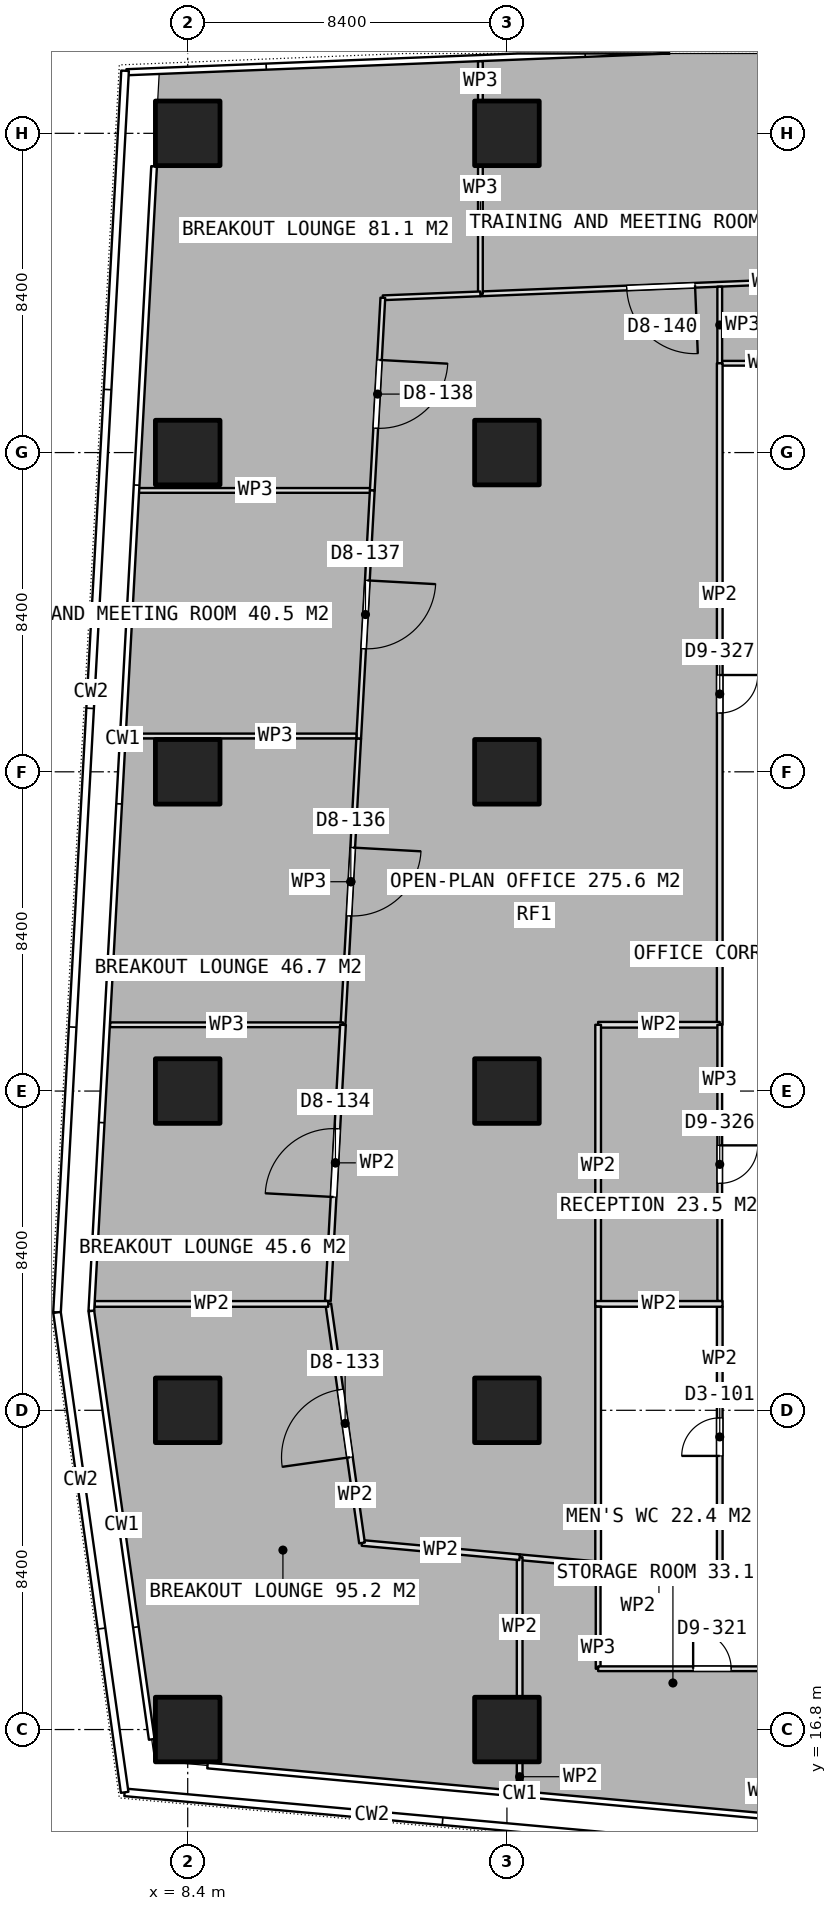
"""IFC4 building model, lengths in metres.
Left out: names, types, materials, properties, quantities, classifications, styles, units other than length and angle.
Written with IfcOpenShell. Run it as: python <this file> out.ifc"""

import sys

from ifc_helpers import new_model, si_unit, direction, frame, frame_2d, origin, origin_2d, place, context, subcontext, project, spatial, rectangle, extrude, element, fill, save


model = new_model("IFC4")
c1 = context("Model", 3, precision=1e-05, world=origin(), true_north=direction((0.0, 1.0)))
c2 = subcontext(c1, "Body", "Model", "MODEL_VIEW")
j1 = project(units=[si_unit("LENGTHUNIT", "METRE"), si_unit("PLANEANGLEUNIT", "RADIAN")], contexts=[c1])
p1 = place(None, origin())
s1 = spatial("IfcSite", under=j1, at=p1, CompositionType="ELEMENT")
p2 = place(p1, origin())
s2 = spatial("IfcBuilding", under=s1, at=p2, CompositionType="ELEMENT")
p3 = place(p2, frame((0.0, 0.0, 99.05)))
s3 = spatial("IfcBuildingStorey", under=s2, at=p3, CompositionType="ELEMENT", Elevation=99.05)
for number, where, z_axis, x_axis in (
    (1, (8.4, 16.8, 0.0), (0.0, 0.0, 1.0), (1.0, 0.0, 0.0)),
    (2, (8.4, 25.2, 0.0), (0.0, 0.0, 1.0), (1.0, 0.0, 0.0)),
    (3, (8.4, 33.6, 0.0), (0.0, 0.0, 1.0), (1.0, 0.0, 0.0)),
    (4, (8.4, 42.0, 0.0), (0.0, 0.0, 1.0), (1.0, 0.0, 0.0)),
    (5, (8.4, 50.4, 0.0), (0.0, 0.0, 1.0), (1.0, 0.0, 0.0)),
    (6, (8.4, 58.8, 0.0), (0.0, 0.0, 1.0), (1.0, 0.0, 0.0)),
    (7, (16.8, 16.8, 0.0), (0.0, 0.0, 1.0), (1.0, 0.0, 0.0)),
    (8, (16.8, 25.2, 0.0), (0.0, 0.0, 1.0), (1.0, 0.0, 0.0)),
    (9, (16.8, 33.6, 0.0), (0.0, 0.0, 1.0), (1.0, 0.0, 0.0)),
    (10, (16.8, 42.0, 0.0), (0.0, 0.0, 1.0), (1.0, 0.0, 0.0)),
    (11, (16.8, 50.4, 0.0), (0.0, 0.0, 1.0), (1.0, 0.0, 0.0)),
    (12, (16.8, 58.8, 0.0), (0.0, 0.0, 1.0), (1.0, 0.0, 0.0)),
):
    element("IfcColumn", number, at=place(p3, frame(where, z_axis=z_axis, x_axis=x_axis)), inside=s3, PredefinedType="COLUMN", context=c2, shape_type="SweptSolid", body=[
        extrude(rectangle(XDim=1.7, YDim=1.7, at=origin_2d()), origin(), (0.0, 0.0, 1.0), 3.75),
    ])
for number, where, z_axis, x_axis in (
    (13, (19.125, 21.0, 0.0), (0.0, 0.0, 1.0), (1.0, 0.0, 0.0)),
    (14, (19.125, 28.0, 0.0), (0.0, 0.0, 1.0), (1.0, 0.0, 0.0)),
):
    element("IfcWall", number, at=place(p3, frame(where, z_axis=z_axis, x_axis=x_axis)), inside=s3, PredefinedType="PARTITIONING", context=c2, shape_type="SweptSolid", body=[
        extrude(rectangle(XDim=3.35, YDim=0.15, at=frame_2d((1.675, 0.0))), origin(), (0.0, 0.0, 1.0), 3.5),
    ])
p4 = place(p3, frame((19.2, 21.075, 0.0), z_axis=(0.0, 0.0, 1.0), x_axis=(0.0, 1.0, 0.0)))
e15 = element("IfcWall", 15, at=p4, inside=s3, PredefinedType="PARTITIONING", context=c2, shape_type="SweptSolid", body=[
    extrude(rectangle(XDim=6.85, YDim=0.15, at=frame_2d((3.425, 0.0))), origin(), (0.0, 0.0, 1.0), 3.5),
])
p5 = place(p3, frame((22.4, 21.075, 0.0), z_axis=(0.0, 0.0, 1.0), x_axis=(0.0, 1.0, 0.0)))
e16 = element("IfcWall", 16, at=p5, inside=s3, PredefinedType="PARTITIONING", context=c2, shape_type="SweptSolid", body=[
    extrude(rectangle(XDim=6.85, YDim=0.15, at=frame_2d((3.425, 0.0))), origin(), (0.0, 0.0, 1.0), 3.5),
])
p6 = place(p5, frame((2.925, 0.0, 0.0)))
e17 = element("IfcOpeningElement", 17, at=p6, cuts=e16, PredefinedType="OPENING", context=c2, shape_type="SweptSolid", body=[
    extrude(rectangle(XDim=1.0, YDim=2.1, at=frame_2d((0.5, 1.05))), frame((0.0, 0.085, 0.0), z_axis=(0.0, -1.0, 0.0), x_axis=(1.0, 0.0, 0.0)), (0.0, 0.0, 1.0), 0.17),
])
p7 = place(p3, frame((25.599, 54.956, 0.0), z_axis=(0.0, 0.0, 1.0), x_axis=(-0.999199932579, -0.039993683677, 0.0)))
e18 = element("IfcWall", 18, at=p7, inside=s3, PredefinedType="PARTITIONING", context=c2, shape_type="SweptSolid", body=[
    extrude(rectangle(XDim=9.505, YDim=0.125, at=frame_2d((4.752, 0.0))), origin(), (0.0, 0.0, 1.0), 3.5),
])
p8 = place(p7, frame((3.852, 0.0, 0.0)))
e19 = element("IfcOpeningElement", 19, at=p8, cuts=e18, PredefinedType="OPENING", context=c2, shape_type="SweptSolid", body=[
    extrude(rectangle(XDim=1.8, YDim=2.1, at=frame_2d((0.9, 1.05))), frame((0.0, 0.073, 0.0), z_axis=(0.0, -1.0, 0.0), x_axis=(1.0, 0.0, 0.0)), (0.0, 0.0, 1.0), 0.145),
])
p9 = place(p3, frame((16.102, 54.576, 0.0), z_axis=(0.0, 0.0, 1.0), x_axis=(0.0, 1.0, 0.0)))
e20 = element("IfcWall", 20, at=p9, inside=s3, PredefinedType="PARTITIONING", context=c2, shape_type="SweptSolid", body=[
    extrude(rectangle(XDim=3.354, YDim=0.125, at=frame_2d((1.677, 0.0))), origin(), (0.0, 0.0, 1.0), 3.5),
])
p10 = place(p3, frame((16.102, 59.67, 0.0), z_axis=(0.0, 0.0, 1.0), x_axis=(0.0, 1.0, 0.0)))
e21 = element("IfcWall", 21, at=p10, inside=s3, PredefinedType="PARTITIONING", context=c2, shape_type="SweptSolid", body=[
    extrude(rectangle(XDim=1.03, YDim=0.125, at=frame_2d((0.515, 0.0))), origin(), (0.0, 0.0, 1.0), 3.5),
])
p11 = place(p3, frame((13.257, 49.404, 0.0), z_axis=(0.0, 0.0, 1.0), x_axis=(-1.0, 0.0, 0.0)))
e22 = element("IfcWall", 22, at=p11, inside=s3, PredefinedType="PARTITIONING", context=c2, shape_type="SweptSolid", body=[
    extrude(rectangle(XDim=6.159, YDim=0.125, at=frame_2d((3.08, 0.0))), origin(), (0.0, 0.0, 1.0), 3.5),
])
p12 = place(p3, frame((16.101, 54.576, 0.0), z_axis=(0.0, 0.0, 1.0), x_axis=(-0.999195025369, -0.040116097489, 0.0)))
e23 = element("IfcWall", 23, at=p12, inside=s3, PredefinedType="PARTITIONING", context=c2, shape_type="SweptSolid", body=[
    extrude(rectangle(XDim=2.568, YDim=0.125, at=frame_2d((1.284, 0.0))), origin(), (0.0, 0.0, 1.0), 3.5),
])
p13 = place(p3, frame((13.535, 54.473, 0.0), z_axis=(0.0, 0.0, 1.0), x_axis=(-0.054729524336, -0.998501216407, 0.0)))
e24 = element("IfcWall", 24, at=p13, inside=s3, PredefinedType="PARTITIONING", context=c2, shape_type="SweptSolid", body=[
    extrude(rectangle(XDim=5.076, YDim=0.125, at=frame_2d((2.538, 0.0))), origin(), (0.0, 0.0, 1.0), 3.5),
])
p14 = place(p13, frame((1.638, 0.0, 0.0)))
e25 = element("IfcOpeningElement", 25, at=p14, cuts=e24, PredefinedType="OPENING", context=c2, shape_type="SweptSolid", body=[
    extrude(rectangle(XDim=1.8, YDim=2.1, at=frame_2d((0.9, 1.05))), frame((0.0, 0.073, 0.0), z_axis=(0.0, -1.0, 0.0), x_axis=(1.0, 0.0, 0.0)), (0.0, 0.0, 1.0), 0.145),
])
p15 = place(p3, frame((13.257, 49.403, 0.0), z_axis=(0.0, 0.0, 1.0), x_axis=(-0.05476496183, -0.998499273388, 0.0)))
e26 = element("IfcWall", 26, at=p15, inside=s3, PredefinedType="PARTITIONING", context=c2, shape_type="SweptSolid", body=[
    extrude(rectangle(XDim=6.54, YDim=0.125, at=frame_2d((3.27, 0.0))), origin(), (0.0, 0.0, 1.0), 3.5),
])
p16 = place(p15, frame((2.37, 0.0, 0.0)))
e27 = element("IfcOpeningElement", 27, at=p16, cuts=e26, PredefinedType="OPENING", context=c2, shape_type="SweptSolid", body=[
    extrude(rectangle(XDim=1.8, YDim=2.1, at=frame_2d((0.9, 1.05))), frame((0.0, 0.073, 0.0), z_axis=(0.0, -1.0, 0.0), x_axis=(1.0, 0.0, 0.0)), (0.0, 0.0, 1.0), 0.145),
])
p17 = place(p3, frame((12.84, 42.943, 0.0), z_axis=(0.0, 0.0, 1.0), x_axis=(-1.0, 0.0, 0.0)))
e28 = element("IfcWall", 28, at=p17, inside=s3, PredefinedType="PARTITIONING", context=c2, shape_type="SweptSolid", body=[
    extrude(rectangle(XDim=6.096, YDim=0.125, at=frame_2d((3.048, 0.0))), origin(), (0.0, 0.0, 1.0), 3.5),
])
p18 = place(p3, frame((12.899, 42.872, 0.0), z_axis=(0.0, 0.0, 1.0), x_axis=(-0.054757999578, -0.998499655224, 0.0)))
e29 = element("IfcWall", 29, at=p18, inside=s3, PredefinedType="PARTITIONING", context=c2, shape_type="SweptSolid", body=[
    extrude(rectangle(XDim=7.539, YDim=0.125, at=frame_2d((3.77, 0.0))), origin(), (0.0, 0.0, 1.0), 3.5),
])
p19 = place(p18, frame((2.87, 0.0, 0.0)))
e30 = element("IfcOpeningElement", 30, at=p19, cuts=e29, PredefinedType="OPENING", context=c2, shape_type="SweptSolid", body=[
    extrude(rectangle(XDim=1.8, YDim=2.1, at=frame_2d((0.9, 1.05))), frame((0.0, 0.073, 0.0), z_axis=(0.0, -1.0, 0.0), x_axis=(1.0, 0.0, 0.0)), (0.0, 0.0, 1.0), 0.145),
])
p20 = place(p3, frame((12.486, 35.344, 0.0), z_axis=(0.0, 0.0, 1.0), x_axis=(-1.0, 0.0, 0.0)))
e31 = element("IfcWall", 31, at=p20, inside=s3, PredefinedType="PARTITIONING", context=c2, shape_type="SweptSolid", body=[
    extrude(rectangle(XDim=6.129, YDim=0.125, at=frame_2d((3.064, 0.0))), origin(), (0.0, 0.0, 1.0), 3.5),
])
p21 = place(p3, frame((28.4, 52.75, 0.0), z_axis=(0.0, 0.0, 1.0), x_axis=(-1.0, 0.0, 0.0)))
e32 = element("IfcWall", 32, at=p21, inside=s3, PredefinedType="PARTITIONING", context=c2, shape_type="SweptSolid", body=[
    extrude(rectangle(XDim=6.0, YDim=0.125, at=frame_2d((3.0, 0.0))), origin(), (0.0, 0.0, 1.0), 3.5),
])
p22 = place(p21, frame((2.5, 0.0, 0.0)))
e33 = element("IfcOpeningElement", 33, at=p22, cuts=e32, PredefinedType="OPENING", context=c2, shape_type="SweptSolid", body=[
    extrude(rectangle(XDim=1.0, YDim=2.1, at=frame_2d((0.5, 1.05))), frame((0.0, 0.073, 0.0), z_axis=(0.0, -1.0, 0.0), x_axis=(1.0, 0.0, 0.0)), (0.0, 0.0, 1.0), 0.145),
])
p23 = place(p3, frame((22.4, 52.75, 0.0), z_axis=(0.0, 0.0, 1.0), x_axis=(0.0, 1.0, 0.0)))
e34 = element("IfcWall", 34, at=p23, inside=s3, PredefinedType="PARTITIONING", context=c2, shape_type="SweptSolid", body=[
    extrude(rectangle(XDim=2.015, YDim=0.125, at=frame_2d((1.007, 0.0))), origin(), (0.0, 0.0, 1.0), 3.5),
])
p24 = place(p3, frame((22.4, 52.75, 0.0), z_axis=(0.0, 0.0, 1.0), x_axis=(0.0, -1.0, 0.0)))
e35 = element("IfcWall", 35, at=p24, inside=s3, PredefinedType="PARTITIONING", context=c2, shape_type="SweptSolid", body=[
    extrude(rectangle(XDim=17.406, YDim=0.15, at=frame_2d((8.703, 0.0))), origin(), (0.0, 0.0, 1.0), 3.5),
])
p25 = place(p24, frame((8.203, 0.0, 0.0)))
e36 = element("IfcOpeningElement", 36, at=p25, cuts=e35, PredefinedType="OPENING", context=c2, shape_type="SweptSolid", body=[
    extrude(rectangle(XDim=1.0, YDim=2.1, at=frame_2d((0.5, 1.05))), frame((0.0, 0.085, 0.0), z_axis=(0.0, -1.0, 0.0), x_axis=(1.0, 0.0, 0.0)), (0.0, 0.0, 1.0), 0.17),
])
p26 = place(p3, frame((22.4, 35.344, 0.0), z_axis=(0.0, 0.0, 1.0), x_axis=(-1.0, 0.0, 0.0)))
e37 = element("IfcWall", 37, at=p26, inside=s3, PredefinedType="PARTITIONING", context=c2, shape_type="SweptSolid", body=[
    extrude(rectangle(XDim=3.2, YDim=0.15, at=frame_2d((1.6, 0.0))), origin(), (0.0, 0.0, 1.0), 3.5),
])
p27 = place(p3, frame((19.2, 35.344, 0.0), z_axis=(0.0, 0.0, 1.0), x_axis=(0.0, -1.0, 0.0)))
e38 = element("IfcWall", 38, at=p27, inside=s3, PredefinedType="PARTITIONING", context=c2, shape_type="SweptSolid", body=[
    extrude(rectangle(XDim=7.419, YDim=0.15, at=frame_2d((3.709, 0.0))), origin(), (0.0, 0.0, 1.0), 3.5),
])
p28 = place(p3, frame((19.125, 21.153, 0.0), z_axis=(0.0, 0.0, 1.0), x_axis=(-0.995937155539, 0.090050997869, 0.0)))
e39 = element("IfcWall", 39, at=p28, inside=s3, PredefinedType="PARTITIONING", context=c2, shape_type="SweptSolid", body=[
    extrude(rectangle(XDim=1.998, YDim=0.15, at=frame_2d((0.999, 0.0))), origin(), (0.0, 0.0, 1.0), 3.5),
])
p29 = place(p3, frame((17.135, 21.333, 0.0), z_axis=(0.0, 0.0, 1.0), x_axis=(0.0, -1.0, 0.0)))
e40 = element("IfcWall", 40, at=p29, inside=s3, PredefinedType="PARTITIONING", context=c2, shape_type="SweptSolid", body=[
    extrude(rectangle(XDim=3.663, YDim=0.15, at=frame_2d((1.832, 0.0))), origin(), (0.0, 0.0, 1.0), 3.5),
])
p30 = place(p3, frame((17.135, 15.93, 0.0), z_axis=(0.0, 0.0, 1.0), x_axis=(0.0, -1.0, 0.0)))
e41 = element("IfcWall", 41, at=p30, inside=s3, PredefinedType="PARTITIONING", context=c2, shape_type="SweptSolid", body=[
    extrude(rectangle(XDim=0.742, YDim=0.15, at=frame_2d((0.371, 0.0))), origin(), (0.0, 0.0, 1.0), 3.5),
])
p31 = place(p3, frame((17.134, 21.333, 0.0), z_axis=(0.0, 0.0, 1.0), x_axis=(-0.995896088747, 0.090504035375, 0.0)))
e42 = element("IfcWall", 42, at=p31, inside=s3, PredefinedType="PARTITIONING", context=c2, shape_type="SweptSolid", body=[
    extrude(rectangle(XDim=4.165, YDim=0.15, at=frame_2d((2.083, 0.0))), origin(), (0.0, 0.0, 1.0), 3.5),
])
p32 = place(p3, frame((12.986, 21.71, 0.0), z_axis=(0.0, 0.0, 1.0), x_axis=(-0.139650607895, 0.99020084211, 0.0)))
e43 = element("IfcWall", 43, at=p32, inside=s3, PredefinedType="PARTITIONING", context=c2, shape_type="SweptSolid", body=[
    extrude(rectangle(XDim=6.351, YDim=0.15, at=frame_2d((3.176, 0.0))), origin(), (0.0, 0.0, 1.0), 3.5),
])
p33 = place(p32, frame((2.276, 0.0, 0.0)))
e44 = element("IfcOpeningElement", 44, at=p33, cuts=e43, PredefinedType="OPENING", context=c2, shape_type="SweptSolid", body=[
    extrude(rectangle(XDim=1.8, YDim=2.1, at=frame_2d((0.9, 1.05))), frame((0.0, 0.085, 0.0), z_axis=(0.0, -1.0, 0.0), x_axis=(1.0, 0.0, 0.0)), (0.0, 0.0, 1.0), 0.17),
])
p34 = place(p3, frame((12.099, 27.999, 0.0), z_axis=(0.0, 0.0, 1.0), x_axis=(-1.0, 0.0, 0.0)))
e45 = element("IfcWall", 45, at=p34, inside=s3, PredefinedType="PARTITIONING", context=c2, shape_type="SweptSolid", body=[
    extrude(rectangle(XDim=6.145, YDim=0.15, at=frame_2d((3.073, 0.0))), origin(), (0.0, 0.0, 1.0), 3.5),
])
p35 = place(p3, frame((12.088, 28.079, 0.0), z_axis=(0.0, 0.0, 1.0), x_axis=(0.0547358223, 0.998500871185, 0.0)))
e46 = element("IfcWall", 46, at=p35, inside=s3, PredefinedType="PARTITIONING", context=c2, shape_type="SweptSolid", body=[
    extrude(rectangle(XDim=7.275, YDim=0.15, at=frame_2d((3.637, 0.0))), origin(), (0.0, 0.0, 1.0), 3.5),
])
p36 = place(p35, frame((2.737, 0.0, 0.0)))
e47 = element("IfcOpeningElement", 47, at=p36, cuts=e46, PredefinedType="OPENING", context=c2, shape_type="SweptSolid", body=[
    extrude(rectangle(XDim=1.8, YDim=2.1, at=frame_2d((0.9, 1.05))), frame((0.0, 0.085, 0.0), z_axis=(0.0, -1.0, 0.0), x_axis=(1.0, 0.0, 0.0)), (0.0, 0.0, 1.0), 0.17),
])
p37 = place(p3, frame((19.2, 21.074, 0.0), z_axis=(0.0, 0.0, 1.0), x_axis=(0.0, -1.0, 0.0)))
e48 = element("IfcWall", 48, at=p37, inside=s3, PredefinedType="PARTITIONING", context=c2, shape_type="SweptSolid", body=[
    extrude(rectangle(XDim=2.674, YDim=0.125, at=frame_2d((1.337, 0.0))), origin(), (0.0, 0.0, 1.0), 3.5),
])
p38 = place(p3, frame((19.2, 18.4, 0.0), z_axis=(0.0, 0.0, 1.0), x_axis=(1.0, 0.0, 0.0)))
e49 = element("IfcWall", 49, at=p38, inside=s3, PredefinedType="PARTITIONING", context=c2, shape_type="SweptSolid", body=[
    extrude(rectangle(XDim=6.001, YDim=0.125, at=frame_2d((3.0, 0.0))), origin(), (0.0, 0.0, 1.0), 3.5),
])
p39 = place(p38, frame((2.5, 0.0, 0.0)))
e50 = element("IfcOpeningElement", 50, at=p39, cuts=e49, PredefinedType="OPENING", context=c2, shape_type="SweptSolid", body=[
    extrude(rectangle(XDim=1.0, YDim=2.1, at=frame_2d((0.5, 1.05))), frame((0.0, 0.073, 0.0), z_axis=(0.0, -1.0, 0.0), x_axis=(1.0, 0.0, 0.0)), (0.0, 0.0, 1.0), 0.145),
])
p40 = place(p3, frame((22.4, 35.343, 0.0), z_axis=(0.0, 0.0, 1.0), x_axis=(0.0, -1.0, 0.0)))
e51 = element("IfcWall", 51, at=p40, inside=s3, PredefinedType="PARTITIONING", context=c2, shape_type="SweptSolid", body=[
    extrude(rectangle(XDim=7.268, YDim=0.125, at=frame_2d((3.634, 0.0))), origin(), (0.0, 0.0, 1.0), 3.5),
])
p41 = place(p40, frame((3.172, 0.0, 0.0)))
e52 = element("IfcOpeningElement", 52, at=p41, cuts=e51, PredefinedType="OPENING", context=c2, shape_type="SweptSolid", body=[
    extrude(rectangle(XDim=1.0, YDim=2.1, at=frame_2d((0.5, 1.05))), frame((0.0, 0.073, 0.0), z_axis=(0.0, -1.0, 0.0), x_axis=(1.0, 0.0, 0.0)), (0.0, 0.0, 1.0), 0.145),
])
p42 = place(p6, origin())
e53 = element("IfcDoor", 53, at=p42, inside=s3, OperationType="SINGLE_SWING_LEFT", PredefinedType="DOOR", context=c2, shape_type="SweptSolid", body=[
    extrude(rectangle(XDim=1.0, YDim=2.1, at=frame_2d((0.5, 1.05))), frame((0.0, 0.025, 0.0), z_axis=(0.0, -1.0, 0.0), x_axis=(1.0, 0.0, 0.0)), (0.0, 0.0, 1.0), 0.05),
])
fill(e17, e53)
p43 = place(p8, origin())
e54 = element("IfcDoor", 54, at=p43, inside=s3, OperationType="DOUBLE_DOOR_SINGLE_SWING", PredefinedType="DOOR", context=c2, shape_type="SweptSolid", body=[
    extrude(rectangle(XDim=1.8, YDim=2.1, at=frame_2d((0.9, 1.05))), frame((0.0, 0.025, 0.0), z_axis=(0.0, -1.0, 0.0), x_axis=(1.0, 0.0, 0.0)), (0.0, 0.0, 1.0), 0.05),
])
fill(e19, e54)
p44 = place(p14, origin())
e55 = element("IfcDoor", 55, at=p44, inside=s3, OperationType="DOUBLE_DOOR_SINGLE_SWING", PredefinedType="DOOR", context=c2, shape_type="SweptSolid", body=[
    extrude(rectangle(XDim=1.8, YDim=2.1, at=frame_2d((0.9, 1.05))), frame((0.0, 0.025, 0.0), z_axis=(0.0, -1.0, 0.0), x_axis=(1.0, 0.0, 0.0)), (0.0, 0.0, 1.0), 0.05),
])
fill(e25, e55)
p45 = place(p16, origin())
e56 = element("IfcDoor", 56, at=p45, inside=s3, OperationType="DOUBLE_DOOR_SINGLE_SWING", PredefinedType="DOOR", context=c2, shape_type="SweptSolid", body=[
    extrude(rectangle(XDim=1.8, YDim=2.1, at=frame_2d((0.9, 1.05))), frame((0.0, 0.025, 0.0), z_axis=(0.0, -1.0, 0.0), x_axis=(1.0, 0.0, 0.0)), (0.0, 0.0, 1.0), 0.05),
])
fill(e27, e56)
p46 = place(p19, origin())
e57 = element("IfcDoor", 57, at=p46, inside=s3, OperationType="DOUBLE_DOOR_SINGLE_SWING", PredefinedType="DOOR", context=c2, shape_type="SweptSolid", body=[
    extrude(rectangle(XDim=1.8, YDim=2.1, at=frame_2d((0.9, 1.05))), frame((0.0, 0.025, 0.0), z_axis=(0.0, -1.0, 0.0), x_axis=(1.0, 0.0, 0.0)), (0.0, 0.0, 1.0), 0.05),
])
fill(e30, e57)
p47 = place(p25, origin())
e58 = element("IfcDoor", 58, at=p47, inside=s3, OperationType="SINGLE_SWING_LEFT", PredefinedType="DOOR", context=c2, shape_type="SweptSolid", body=[
    extrude(rectangle(XDim=1.0, YDim=2.1, at=frame_2d((0.5, 1.05))), frame((0.0, 0.025, 0.0), z_axis=(0.0, -1.0, 0.0), x_axis=(1.0, 0.0, 0.0)), (0.0, 0.0, 1.0), 0.05),
])
fill(e36, e58)
p48 = place(p36, origin())
e59 = element("IfcDoor", 59, at=p48, inside=s3, OperationType="DOUBLE_DOOR_SINGLE_SWING", PredefinedType="DOOR", context=c2, shape_type="SweptSolid", body=[
    extrude(rectangle(XDim=1.8, YDim=2.1, at=frame_2d((0.9, 1.05))), frame((0.0, 0.025, 0.0), z_axis=(0.0, -1.0, 0.0), x_axis=(1.0, 0.0, 0.0)), (0.0, 0.0, 1.0), 0.05),
])
fill(e47, e59)
p49 = place(p33, origin())
e60 = element("IfcDoor", 60, at=p49, inside=s3, OperationType="DOUBLE_DOOR_SINGLE_SWING", PredefinedType="DOOR", context=c2, shape_type="SweptSolid", body=[
    extrude(rectangle(XDim=1.8, YDim=2.1, at=frame_2d((0.9, 1.05))), frame((0.0, 0.025, 0.0), z_axis=(0.0, -1.0, 0.0), x_axis=(1.0, 0.0, 0.0)), (0.0, 0.0, 1.0), 0.05),
])
fill(e44, e60)
p50 = place(p39, origin())
e61 = element("IfcDoor", 61, at=p50, inside=s3, OperationType="SINGLE_SWING_LEFT", PredefinedType="DOOR", context=c2, shape_type="SweptSolid", body=[
    extrude(rectangle(XDim=1.0, YDim=2.1, at=frame_2d((0.5, 1.05))), frame((0.0, 0.025, 0.0), z_axis=(0.0, -1.0, 0.0), x_axis=(1.0, 0.0, 0.0)), (0.0, 0.0, 1.0), 0.05),
])
fill(e50, e61)
p51 = place(p41, origin())
e62 = element("IfcDoor", 62, at=p51, inside=s3, OperationType="SINGLE_SWING_LEFT", PredefinedType="DOOR", context=c2, shape_type="SweptSolid", body=[
    extrude(rectangle(XDim=1.0, YDim=2.1, at=frame_2d((0.5, 1.05))), frame((0.0, 0.025, 0.0), z_axis=(0.0, -1.0, 0.0), x_axis=(1.0, 0.0, 0.0)), (0.0, 0.0, 1.0), 0.05),
])
fill(e52, e62)
save(model, sys.argv[1])
